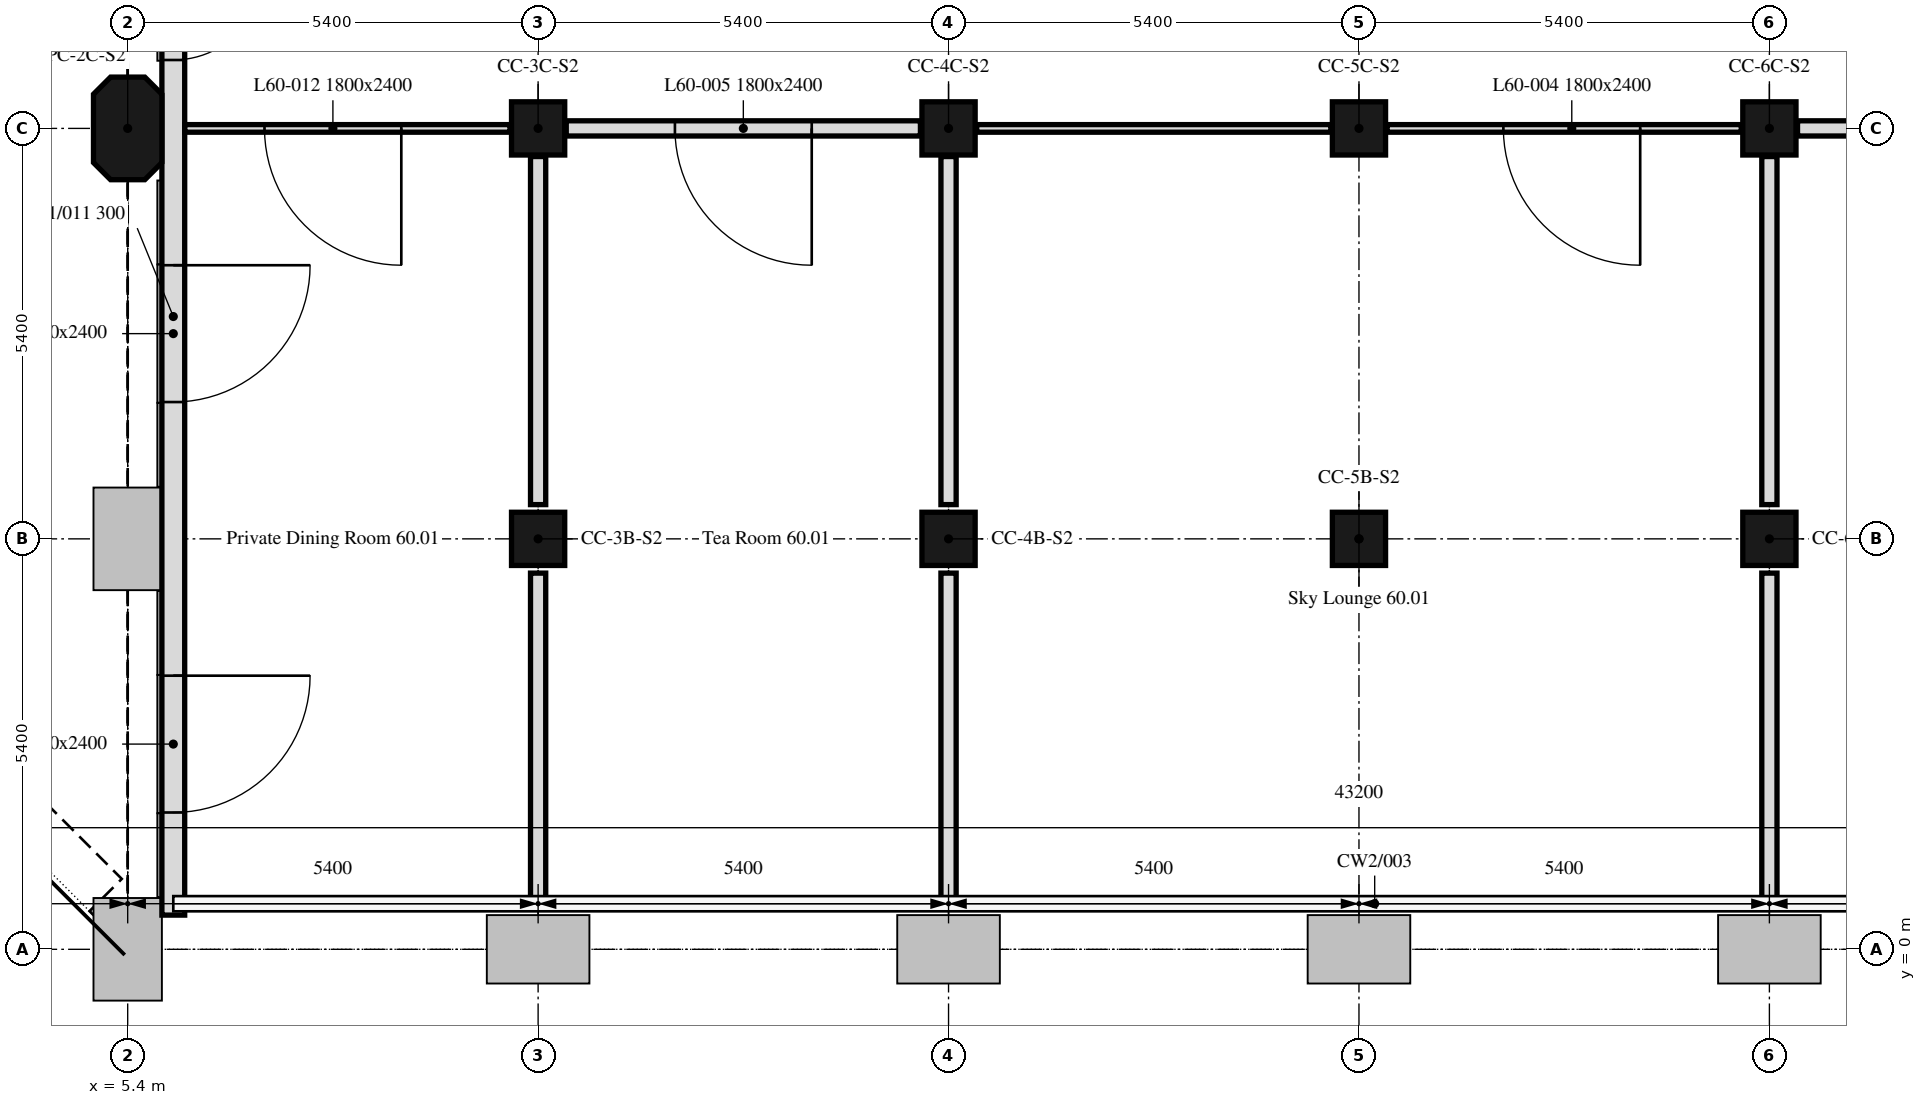
"""IFC4 building model, lengths in metres.
Left out: names, types, materials, properties, quantities, classifications, styles, units other than length and angle.
Written with IfcOpenShell. Run it as: python <this file> out.ifc"""

import sys

from ifc_helpers import new_model, si_unit, direction, frame, frame_2d, origin, origin_2d, place, context, subcontext, project, spatial, polyline, rectangle, outline, extrude, element, fill, save


model = new_model("IFC4")
c1 = context("Model", 3, precision=1e-05, world=origin(), true_north=direction((0.0, 1.0)))
c2 = subcontext(c1, "Body", "Model", "MODEL_VIEW")
j1 = project(units=[si_unit("LENGTHUNIT", "METRE"), si_unit("PLANEANGLEUNIT", "RADIAN")], contexts=[c1])
p1 = place(None, origin())
s1 = spatial("IfcSite", under=j1, at=p1, CompositionType="ELEMENT")
p2 = place(p1, origin())
s2 = spatial("IfcBuilding", under=s1, at=p2, CompositionType="ELEMENT")
p3 = place(p2, frame((0.0, 0.0, 243.1)))
s3 = spatial("IfcBuildingStorey", under=s2, at=p3, CompositionType="ELEMENT", Elevation=243.1)
for number, where, z_axis, x_axis in (
    (1, (10.8, 5.4, 0.0), (0.0, 0.0, 1.0), (1.0, 0.0, 0.0)),
    (2, (16.2, 5.4, 0.0), (0.0, 0.0, 1.0), (1.0, 0.0, 0.0)),
    (3, (21.6, 5.4, 0.0), (0.0, 0.0, 1.0), (1.0, 0.0, 0.0)),
    (4, (27.0, 5.4, 0.0), (0.0, 0.0, 1.0), (1.0, 0.0, 0.0)),
):
    element("IfcColumn", number, at=place(p3, frame(where, z_axis=z_axis, x_axis=x_axis)), inside=s3, PredefinedType="COLUMN", context=c2, shape_type="SweptSolid", body=[
        extrude(rectangle(XDim=0.7, YDim=0.7, at=origin_2d()), origin(), (0.0, 0.0, 1.0), 7.5),
    ])
p4 = place(p3, frame((5.4, 10.8, 0.0), z_axis=(0.0, 0.0, 1.0), x_axis=(0.0, 1.0, 0.0)))
e5 = element("IfcColumn", 5, at=p4, inside=s3, PredefinedType="COLUMN", context=c2, shape_type="SweptSolid", body=[
    extrude(outline(polyline([(-0.45, -0.45), (0.45, -0.45), (0.675, -0.225), (0.675, 0.225), (0.45, 0.45), (-0.45, 0.45), (-0.675, 0.225), (-0.675, -0.225), (-0.45, -0.45)])), origin(), (0.0, 0.0, 1.0), 7.5),
])
for number, where, z_axis, x_axis in (
    (6, (10.8, 10.8, 0.0), (0.0, 0.0, 1.0), (1.0, 0.0, 0.0)),
    (7, (16.2, 10.8, 0.0), (0.0, 0.0, 1.0), (1.0, 0.0, 0.0)),
    (8, (21.6, 10.8, 0.0), (0.0, 0.0, 1.0), (1.0, 0.0, 0.0)),
    (9, (27.0, 10.8, 0.0), (0.0, 0.0, 1.0), (1.0, 0.0, 0.0)),
):
    element("IfcColumn", number, at=place(p3, frame(where, z_axis=z_axis, x_axis=x_axis)), inside=s3, PredefinedType="COLUMN", context=c2, shape_type="SweptSolid", body=[
        extrude(rectangle(XDim=0.7, YDim=0.7, at=origin_2d()), origin(), (0.0, 0.0, 1.0), 7.5),
    ])
p5 = place(p3, frame((6.0, 16.2, 0.0), z_axis=(0.0, 0.0, 1.0), x_axis=(0.0, -1.0, 0.0)))
e10 = element("IfcWall", 10, at=p5, inside=s3, PredefinedType="SOLIDWALL", context=c2, shape_type="SweptSolid", body=[
    extrude(rectangle(XDim=15.75, YDim=0.3, at=frame_2d((7.875, 0.0))), origin(), (0.0, 0.0, 1.0), 7.5),
])
p6 = place(p5, frame((3.3, 0.0, 0.0)))
e11 = element("IfcOpeningElement", 11, at=p6, cuts=e10, PredefinedType="OPENING", context=c2, shape_type="SweptSolid", body=[
    extrude(rectangle(XDim=1.2, YDim=2.4, at=frame_2d((0.6, 1.2))), frame((0.0, 0.16, 0.0), z_axis=(0.0, -1.0, 0.0), x_axis=(1.0, 0.0, 0.0)), (0.0, 0.0, 1.0), 0.32),
])
p7 = place(p5, frame((7.2, 0.0, 0.0)))
e12 = element("IfcOpeningElement", 12, at=p7, cuts=e10, PredefinedType="OPENING", context=c2, shape_type="SweptSolid", body=[
    extrude(rectangle(XDim=1.8, YDim=2.4, at=frame_2d((0.9, 1.2))), frame((0.0, 0.16, 0.0), z_axis=(0.0, -1.0, 0.0), x_axis=(1.0, 0.0, 0.0)), (0.0, 0.0, 1.0), 0.32),
])
p8 = place(p5, frame((12.6, 0.0, 0.0)))
e13 = element("IfcOpeningElement", 13, at=p8, cuts=e10, PredefinedType="OPENING", context=c2, shape_type="SweptSolid", body=[
    extrude(rectangle(XDim=1.8, YDim=2.4, at=frame_2d((0.9, 1.2))), frame((0.0, 0.16, 0.0), z_axis=(0.0, -1.0, 0.0), x_axis=(1.0, 0.0, 0.0)), (0.0, 0.0, 1.0), 0.32),
])
p9 = place(p3, frame((32.03, 10.8, 0.0), z_axis=(0.0, 0.0, 1.0), x_axis=(-1.0, 0.0, 0.0)))
e14 = element("IfcWall", 14, at=p9, inside=s3, PredefinedType="PARTITIONING", context=c2, shape_type="SweptSolid", body=[
    extrude(rectangle(XDim=4.66, YDim=0.2, at=frame_2d((2.33, 0.0))), origin(), (0.0, 0.0, 1.0), 7.5),
])
p10 = place(p9, frame((1.43, 0.0, 0.0)))
e15 = element("IfcOpeningElement", 15, at=p10, cuts=e14, PredefinedType="OPENING", context=c2, shape_type="SweptSolid", body=[
    extrude(rectangle(XDim=1.8, YDim=2.4, at=frame_2d((0.9, 1.2))), frame((0.0, 0.1, 0.0), z_axis=(0.0, -1.0, 0.0), x_axis=(1.0, 0.0, 0.0)), (0.0, 0.0, 1.0), 0.2),
])
p11 = place(p3, frame((27.0, 10.43, 0.0), z_axis=(0.0, 0.0, 1.0), x_axis=(0.0, -1.0, 0.0)))
e16 = element("IfcWall", 16, at=p11, inside=s3, PredefinedType="PARTITIONING", context=c2, shape_type="SweptSolid", body=[
    extrude(rectangle(XDim=4.579, YDim=0.2, at=frame_2d((2.29, 0.0))), origin(), (0.0, 0.0, 1.0), 6.75),
])
p12 = place(p3, frame((27.0, 4.949, 0.0), z_axis=(0.0, 0.0, 1.0), x_axis=(0.0, -1.0, 0.0)))
e17 = element("IfcWall", 17, at=p12, inside=s3, PredefinedType="PARTITIONING", context=c2, shape_type="SweptSolid", body=[
    extrude(rectangle(XDim=4.349, YDim=0.2, at=frame_2d((2.175, 0.0))), origin(), (0.0, 0.0, 1.0), 6.75),
])
p13 = place(p3, frame((26.63, 10.8, 0.0), z_axis=(0.0, 0.0, 1.0), x_axis=(-1.0, 0.0, 0.0)))
e18 = element("IfcWall", 18, at=p13, inside=s3, PredefinedType="PARTITIONING", context=c2, shape_type="SweptSolid", body=[
    extrude(rectangle(XDim=4.66, YDim=0.1, at=frame_2d((2.33, 0.0))), origin(), (0.0, 0.0, 1.0), 7.5),
])
p14 = place(p13, frame((1.33, 0.0, 0.0)))
e19 = element("IfcOpeningElement", 19, at=p14, cuts=e18, PredefinedType="OPENING", context=c2, shape_type="SweptSolid", body=[
    extrude(rectangle(XDim=1.8, YDim=2.4, at=frame_2d((0.9, 1.2))), frame((0.0, 0.05, 0.0), z_axis=(0.0, -1.0, 0.0), x_axis=(1.0, 0.0, 0.0)), (0.0, 0.0, 1.0), 0.1),
])
p15 = place(p3, frame((21.23, 10.8, 0.0), z_axis=(0.0, 0.0, 1.0), x_axis=(-1.0, 0.0, 0.0)))
e20 = element("IfcWall", 20, at=p15, inside=s3, PredefinedType="PARTITIONING", context=c2, shape_type="SweptSolid", body=[
    extrude(rectangle(XDim=4.66, YDim=0.1, at=frame_2d((2.33, 0.0))), origin(), (0.0, 0.0, 1.0), 7.5),
])
p16 = place(p3, frame((16.2, 10.43, 0.0), z_axis=(0.0, 0.0, 1.0), x_axis=(0.0, -1.0, 0.0)))
e21 = element("IfcWall", 21, at=p16, inside=s3, PredefinedType="PARTITIONING", context=c2, shape_type="SweptSolid", body=[
    extrude(rectangle(XDim=4.579, YDim=0.2, at=frame_2d((2.29, 0.0))), origin(), (0.0, 0.0, 1.0), 6.75),
])
p17 = place(p3, frame((16.2, 4.949, 0.0), z_axis=(0.0, 0.0, 1.0), x_axis=(0.0, -1.0, 0.0)))
e22 = element("IfcWall", 22, at=p17, inside=s3, PredefinedType="PARTITIONING", context=c2, shape_type="SweptSolid", body=[
    extrude(rectangle(XDim=4.349, YDim=0.2, at=frame_2d((2.175, 0.0))), origin(), (0.0, 0.0, 1.0), 6.75),
])
p18 = place(p3, frame((15.83, 10.8, 0.0), z_axis=(0.0, 0.0, 1.0), x_axis=(-1.0, 0.0, 0.0)))
e23 = element("IfcWall", 23, at=p18, inside=s3, PredefinedType="PARTITIONING", context=c2, shape_type="SweptSolid", body=[
    extrude(rectangle(XDim=4.66, YDim=0.2, at=frame_2d((2.33, 0.0))), origin(), (0.0, 0.0, 1.0), 7.5),
])
p19 = place(p18, frame((1.43, 0.0, 0.0)))
e24 = element("IfcOpeningElement", 24, at=p19, cuts=e23, PredefinedType="OPENING", context=c2, shape_type="SweptSolid", body=[
    extrude(rectangle(XDim=1.8, YDim=2.4, at=frame_2d((0.9, 1.2))), frame((0.0, 0.1, 0.0), z_axis=(0.0, -1.0, 0.0), x_axis=(1.0, 0.0, 0.0)), (0.0, 0.0, 1.0), 0.2),
])
p20 = place(p3, frame((10.8, 10.43, 0.0), z_axis=(0.0, 0.0, 1.0), x_axis=(0.0, -1.0, 0.0)))
e25 = element("IfcWall", 25, at=p20, inside=s3, PredefinedType="PARTITIONING", context=c2, shape_type="SweptSolid", body=[
    extrude(rectangle(XDim=4.579, YDim=0.2, at=frame_2d((2.29, 0.0))), origin(), (0.0, 0.0, 1.0), 6.75),
])
p21 = place(p3, frame((10.8, 4.949, 0.0), z_axis=(0.0, 0.0, 1.0), x_axis=(0.0, -1.0, 0.0)))
e26 = element("IfcWall", 26, at=p21, inside=s3, PredefinedType="PARTITIONING", context=c2, shape_type="SweptSolid", body=[
    extrude(rectangle(XDim=4.349, YDim=0.2, at=frame_2d((2.175, 0.0))), origin(), (0.0, 0.0, 1.0), 6.75),
])
p22 = place(p3, frame((10.43, 10.8, 0.0), z_axis=(0.0, 0.0, 1.0), x_axis=(-1.0, 0.0, 0.0)))
e27 = element("IfcWall", 27, at=p22, inside=s3, PredefinedType="PARTITIONING", context=c2, shape_type="SweptSolid", body=[
    extrude(rectangle(XDim=4.279, YDim=0.1, at=frame_2d((2.14, 0.0))), origin(), (0.0, 0.0, 1.0), 7.5),
])
p23 = place(p22, frame((1.43, 0.0, 0.0)))
e28 = element("IfcOpeningElement", 28, at=p23, cuts=e27, PredefinedType="OPENING", context=c2, shape_type="SweptSolid", body=[
    extrude(rectangle(XDim=1.8, YDim=2.4, at=frame_2d((0.9, 1.2))), frame((0.0, 0.05, 0.0), z_axis=(0.0, -1.0, 0.0), x_axis=(1.0, 0.0, 0.0)), (0.0, 0.0, 1.0), 0.1),
])
p24 = place(p6, origin())
e29 = element("IfcDoor", 29, at=p24, inside=s3, OperationType="SINGLE_SWING_LEFT", PredefinedType="DOOR", context=c2, shape_type="SweptSolid", body=[
    extrude(rectangle(XDim=1.2, YDim=2.4, at=frame_2d((0.6, 1.2))), frame((0.0, 0.025, 0.0), z_axis=(0.0, -1.0, 0.0), x_axis=(1.0, 0.0, 0.0)), (0.0, 0.0, 1.0), 0.05),
])
fill(e11, e29)
p25 = place(p7, origin())
e30 = element("IfcDoor", 30, at=p25, inside=s3, OperationType="DOUBLE_DOOR_DOUBLE_SWING", PredefinedType="DOOR", context=c2, shape_type="SweptSolid", body=[
    extrude(rectangle(XDim=1.8, YDim=2.4, at=frame_2d((0.9, 1.2))), frame((0.0, 0.025, 0.0), z_axis=(0.0, -1.0, 0.0), x_axis=(1.0, 0.0, 0.0)), (0.0, 0.0, 1.0), 0.05),
])
fill(e12, e30)
p26 = place(p8, origin())
e31 = element("IfcDoor", 31, at=p26, inside=s3, OperationType="DOUBLE_DOOR_DOUBLE_SWING", PredefinedType="DOOR", context=c2, shape_type="SweptSolid", body=[
    extrude(rectangle(XDim=1.8, YDim=2.4, at=frame_2d((0.9, 1.2))), frame((0.0, 0.025, 0.0), z_axis=(0.0, -1.0, 0.0), x_axis=(1.0, 0.0, 0.0)), (0.0, 0.0, 1.0), 0.05),
])
fill(e13, e31)
p27 = place(p14, origin())
e32 = element("IfcDoor", 32, at=p27, inside=s3, OperationType="DOUBLE_DOOR_SINGLE_SWING", PredefinedType="DOOR", context=c2, shape_type="SweptSolid", body=[
    extrude(rectangle(XDim=1.8, YDim=2.4, at=frame_2d((0.9, 1.2))), frame((0.0, 0.025, 0.0), z_axis=(0.0, -1.0, 0.0), x_axis=(1.0, 0.0, 0.0)), (0.0, 0.0, 1.0), 0.05),
])
fill(e19, e32)
p28 = place(p19, origin())
e33 = element("IfcDoor", 33, at=p28, inside=s3, OperationType="DOUBLE_DOOR_SINGLE_SWING", PredefinedType="DOOR", context=c2, shape_type="SweptSolid", body=[
    extrude(rectangle(XDim=1.8, YDim=2.4, at=frame_2d((0.9, 1.2))), frame((0.0, 0.025, 0.0), z_axis=(0.0, -1.0, 0.0), x_axis=(1.0, 0.0, 0.0)), (0.0, 0.0, 1.0), 0.05),
])
fill(e24, e33)
p29 = place(p23, origin())
e34 = element("IfcDoor", 34, at=p29, inside=s3, OperationType="DOUBLE_DOOR_SINGLE_SWING", PredefinedType="DOOR", context=c2, shape_type="SweptSolid", body=[
    extrude(rectangle(XDim=1.8, YDim=2.4, at=frame_2d((0.9, 1.2))), frame((0.0, 0.025, 0.0), z_axis=(0.0, -1.0, 0.0), x_axis=(1.0, 0.0, 0.0)), (0.0, 0.0, 1.0), 0.05),
])
fill(e28, e34)
save(model, sys.argv[1])
